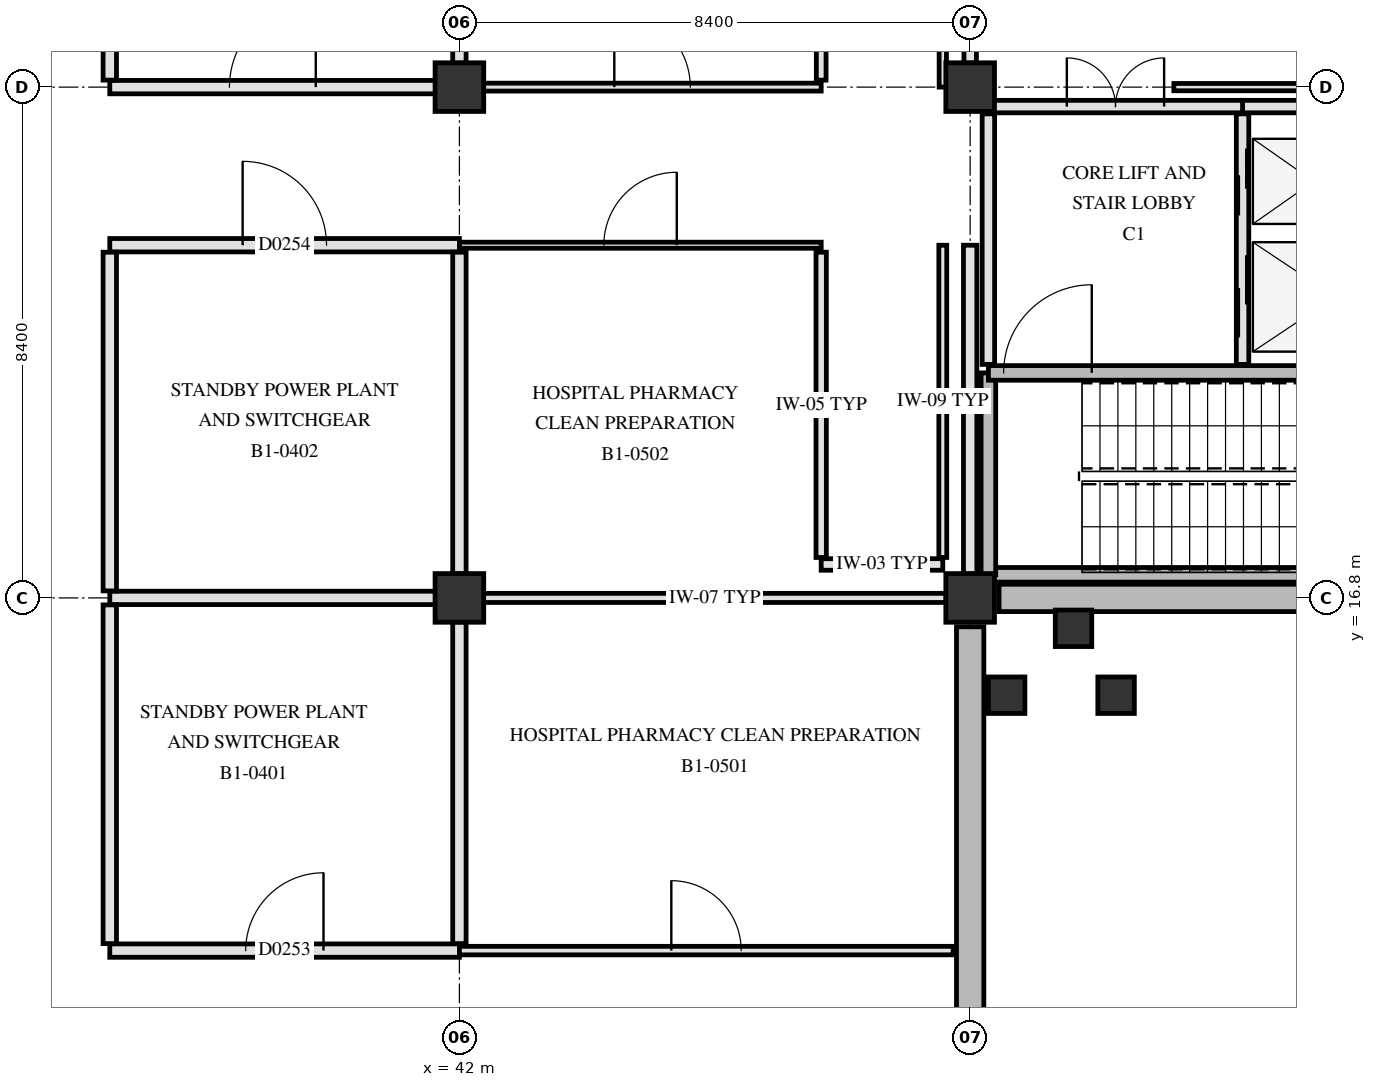
"""IFC4 building model, lengths in metres.
Left out: names, types, materials, properties, quantities, classifications, styles, units other than length and angle.
Written with IfcOpenShell. Run it as: python <this file> out.ifc"""

import sys

from ifc_helpers import new_model, si_unit, direction, frame, frame_2d, origin, origin_2d, place, context, subcontext, project, spatial, rectangle, extrude, element, fill, save


model = new_model("IFC4")
c1 = context("Model", 3, precision=1e-05, world=origin(), true_north=direction((0.0, 1.0)))
c2 = subcontext(c1, "Body", "Model", "MODEL_VIEW")
j1 = project(units=[si_unit("LENGTHUNIT", "METRE"), si_unit("PLANEANGLEUNIT", "RADIAN")], contexts=[c1])
p1 = place(None, origin())
s1 = spatial("IfcSite", under=j1, at=p1, CompositionType="ELEMENT")
p2 = place(p1, origin())
s2 = spatial("IfcBuilding", under=s1, at=p2, CompositionType="ELEMENT")
p3 = place(p2, frame((0.0, 0.0, -5.4)))
s3 = spatial("IfcBuildingStorey", under=s2, at=p3, CompositionType="ELEMENT", Elevation=-5.4)
for number, where, z_axis, x_axis in (
    (1, (42.0, 16.8, 0.0), (0.0, 0.0, 1.0), (1.0, 0.0, 0.0)),
    (2, (42.0, 25.2, 0.0), (0.0, 0.0, 1.0), (1.0, 0.0, 0.0)),
    (3, (50.4, 16.8, 0.0), (0.0, 0.0, 1.0), (1.0, 0.0, 0.0)),
    (4, (50.4, 25.2, 0.0), (0.0, 0.0, 1.0), (1.0, 0.0, 0.0)),
):
    element("IfcColumn", number, at=place(p3, frame(where, z_axis=z_axis, x_axis=x_axis)), inside=s3, PredefinedType="COLUMN", context=c2, shape_type="SweptSolid", body=[
        extrude(rectangle(XDim=0.8, YDim=0.8, at=origin_2d()), origin(), (0.0, 0.0, 1.0), 5.4),
    ])
for number, where, z_axis, x_axis in (
    (5, (58.325, 16.8, 0.0), (0.0, 0.0, 1.0), (-1.0, 0.0, 0.0)),
    (6, (50.4, 16.325, 0.0), (0.0, 0.0, 1.0), (0.0, -1.0, 0.0)),
):
    element("IfcWall", number, at=place(p3, frame(where, z_axis=z_axis, x_axis=x_axis)), inside=s3, PredefinedType="SOLIDWALL", context=c2, shape_type="SweptSolid", body=[
        extrude(rectangle(XDim=7.45, YDim=0.45, at=frame_2d((3.725, 0.0))), origin(), (0.0, 0.0, 1.0), 5.08),
    ])
for number, where, z_axis, x_axis in (
    (7, (52.8, 15.2, 0.0), (0.0, 0.0, 1.0), (1.0, 0.0, 0.0)),
    (8, (51.0, 15.2, 0.0), (0.0, 0.0, 1.0), (1.0, 0.0, 0.0)),
):
    element("IfcColumn", number, at=place(p3, frame(where, z_axis=z_axis, x_axis=x_axis)), inside=s3, PredefinedType="COLUMN", context=c2, shape_type="SweptSolid", body=[
        extrude(rectangle(XDim=0.6, YDim=0.6, at=origin_2d()), origin(), (0.0, 0.0, 1.0), 4.0),
    ])
p4 = place(p3, frame((52.1, 16.3, 0.0), z_axis=(0.0, 0.0, 1.0), x_axis=(1.0, 0.0, 0.0)))
e9 = element("IfcColumn", 9, at=p4, inside=s3, PredefinedType="COLUMN", context=c2, shape_type="SweptSolid", body=[
    extrude(rectangle(XDim=0.6, YDim=0.6, at=origin_2d()), origin(), (0.0, 0.0, 1.0), 5.09),
])
p5 = place(p3, frame((50.7, 17.18, 0.0), z_axis=(0.0, 0.0, 1.0), x_axis=(1.0, 0.0, 0.0)))
e10 = element("IfcWall", 10, at=p5, inside=s3, PredefinedType="SHEAR", context=c2, shape_type="SweptSolid", body=[
    extrude(rectangle(XDim=7.82, YDim=0.24, at=frame_2d((3.91, 0.0))), origin(), (0.0, 0.0, 1.0), 5.08),
])
p6 = place(p3, frame((50.7, 17.18, 0.0), z_axis=(0.0, 0.0, 1.0), x_axis=(0.0, 1.0, 0.0)))
e11 = element("IfcWall", 11, at=p6, inside=s3, PredefinedType="SHEAR", context=c2, shape_type="SweptSolid", body=[
    extrude(rectangle(XDim=3.32, YDim=0.24, at=frame_2d((1.66, 0.0))), origin(), (0.0, 0.0, 1.0), 5.08),
])
p7 = place(p3, frame((50.7, 20.5, 0.0), z_axis=(0.0, 0.0, 1.0), x_axis=(1.0, 0.0, 0.0)))
e12 = element("IfcWall", 12, at=p7, inside=s3, PredefinedType="SHEAR", context=c2, shape_type="SweptSolid", body=[
    extrude(rectangle(XDim=7.82, YDim=0.24, at=frame_2d((3.91, 0.0))), origin(), (0.0, 0.0, 1.0), 5.08),
])
p8 = place(p7, frame((0.25, 0.0, 0.0)))
e13 = element("IfcOpeningElement", 13, at=p8, cuts=e12, PredefinedType="OPENING", context=c2, shape_type="SweptSolid", body=[
    extrude(rectangle(XDim=1.45, YDim=2.2, at=frame_2d((0.725, 1.1))), frame((0.0, 0.13, 0.0), z_axis=(0.0, -1.0, 0.0), x_axis=(1.0, 0.0, 0.0)), (0.0, 0.0, 1.0), 0.26),
])
p9 = place(p3, frame((54.88, 20.64, 0.0), z_axis=(0.0, 0.0, 1.0), x_axis=(0.0, 1.0, 0.0)))
e14 = element("IfcWall", 14, at=p9, inside=s3, PredefinedType="PARTITIONING", context=c2, shape_type="SweptSolid", body=[
    extrude(rectangle(XDim=4.12, YDim=0.205, at=frame_2d((2.06, 0.0))), origin(), (0.0, 0.0, 1.0), 5.07),
])
p10 = place(p9, frame((0.445, 0.0, 0.0)))
e15 = element("IfcOpeningElement", 15, at=p10, cuts=e14, PredefinedType="OPENING", context=c2, shape_type="SweptSolid", body=[
    extrude(rectangle(XDim=1.35, YDim=2.2, at=frame_2d((0.675, 1.1))), frame((0.0, 0.113, 0.0), z_axis=(0.0, -1.0, 0.0), x_axis=(1.0, 0.0, 0.0)), (0.0, 0.0, 1.0), 0.225),
])
p11 = place(p9, frame((2.45, 0.0, 0.0)))
e16 = element("IfcOpeningElement", 16, at=p11, cuts=e14, PredefinedType="OPENING", context=c2, shape_type="SweptSolid", body=[
    extrude(rectangle(XDim=1.1, YDim=2.15, at=frame_2d((0.55, 1.075))), frame((0.0, 0.113, 0.0), z_axis=(0.0, -1.0, 0.0), x_axis=(1.0, 0.0, 0.0)), (0.0, 0.0, 1.0), 0.225),
])
p12 = place(p3, frame((54.88, 24.88, 0.0), z_axis=(0.0, 0.0, 1.0), x_axis=(1.0, 0.0, 0.0)))
e17 = element("IfcWall", 17, at=p12, inside=s3, PredefinedType="PARTITIONING", context=c2, shape_type="SweptSolid", body=[
    extrude(rectangle(XDim=3.57, YDim=0.205, at=frame_2d((1.785, 0.0))), origin(), (0.0, 0.0, 1.0), 4.42),
])
p13 = place(p3, frame((50.7, 20.64, 0.0), z_axis=(0.0, 0.0, 1.0), x_axis=(0.0, 1.0, 0.0)))
e18 = element("IfcWall", 18, at=p13, inside=s3, PredefinedType="PARTITIONING", context=c2, shape_type="SweptSolid", body=[
    extrude(rectangle(XDim=4.12, YDim=0.205, at=frame_2d((2.06, 0.0))), origin(), (0.0, 0.0, 1.0), 4.47),
])
p14 = place(p3, frame((50.7, 24.88, 0.0), z_axis=(0.0, 0.0, 1.0), x_axis=(1.0, 0.0, 0.0)))
e19 = element("IfcWall", 19, at=p14, inside=s3, PredefinedType="PARTITIONING", context=c2, shape_type="SweptSolid", body=[
    extrude(rectangle(XDim=4.18, YDim=0.205, at=frame_2d((2.09, 0.0))), origin(), (0.0, 0.0, 1.0), 4.42),
])
p15 = place(p14, frame((1.29, 0.0, 0.0)))
e20 = element("IfcOpeningElement", 20, at=p15, cuts=e19, PredefinedType="OPENING", context=c2, shape_type="SweptSolid", body=[
    extrude(rectangle(XDim=1.6, YDim=2.25, at=frame_2d((0.8, 1.125))), frame((0.0, 0.113, 0.0), z_axis=(0.0, -1.0, 0.0), x_axis=(1.0, 0.0, 0.0)), (0.0, 0.0, 1.0), 0.225),
])
p16 = place(p3, frame((36.25, 11.0, 0.0), z_axis=(0.0, 0.0, 1.0), x_axis=(1.0, 0.0, 0.0)))
e21 = element("IfcWall", 21, at=p16, inside=s3, PredefinedType="PARTITIONING", context=c2, shape_type="SweptSolid", body=[
    extrude(rectangle(XDim=5.75, YDim=0.22, at=frame_2d((2.875, 0.0))), origin(), (0.0, 0.0, 1.0), 4.47),
])
p17 = place(p16, frame((2.235, 0.0, 0.0)))
e22 = element("IfcOpeningElement", 22, at=p17, cuts=e21, PredefinedType="OPENING", context=c2, shape_type="SweptSolid", body=[
    extrude(rectangle(XDim=1.28, YDim=2.18, at=frame_2d((0.64, 1.09))), frame((0.0, 0.12, 0.0), z_axis=(0.0, -1.0, 0.0), x_axis=(1.0, 0.0, 0.0)), (0.0, 0.0, 1.0), 0.24),
])
p18 = place(p3, frame((42.0, 11.0, 0.0), z_axis=(0.0, 0.0, 1.0), x_axis=(1.0, 0.0, 0.0)))
e23 = element("IfcWall", 23, at=p18, inside=s3, PredefinedType="PARTITIONING", context=c2, shape_type="SweptSolid", body=[
    extrude(rectangle(XDim=8.12, YDim=0.14, at=frame_2d((4.06, 0.0))), origin(), (0.0, 0.0, 1.0), 4.47),
])
p19 = place(p18, frame((3.485, 0.0, 0.0)))
e24 = element("IfcOpeningElement", 24, at=p19, cuts=e23, PredefinedType="OPENING", context=c2, shape_type="SweptSolid", body=[
    extrude(rectangle(XDim=1.15, YDim=2.15, at=frame_2d((0.575, 1.075))), frame((0.0, 0.08, 0.0), z_axis=(0.0, -1.0, 0.0), x_axis=(1.0, 0.0, 0.0)), (0.0, 0.0, 1.0), 0.16),
])
p20 = place(p3, frame((36.25, 16.8, 0.0), z_axis=(0.0, 0.0, 1.0), x_axis=(1.0, 0.0, 0.0)))
e25 = element("IfcWall", 25, at=p20, inside=s3, PredefinedType="PARTITIONING", context=c2, shape_type="SweptSolid", body=[
    extrude(rectangle(XDim=5.355, YDim=0.22, at=frame_2d((2.677, 0.0))), origin(), (0.0, 0.0, 1.0), 4.42),
])
p21 = place(p3, frame((42.395, 16.8, 0.0), z_axis=(0.0, 0.0, 1.0), x_axis=(1.0, 0.0, 0.0)))
e26 = element("IfcWall", 26, at=p21, inside=s3, PredefinedType="PARTITIONING", context=c2, shape_type="SweptSolid", body=[
    extrude(rectangle(XDim=7.61, YDim=0.15, at=frame_2d((3.805, 0.0))), origin(), (0.0, 0.0, 1.0), 4.42),
])
p22 = place(p3, frame((47.95, 17.35, 0.0), z_axis=(0.0, 0.0, 1.0), x_axis=(1.0, 0.0, 0.0)))
e27 = element("IfcWall", 27, at=p22, inside=s3, PredefinedType="PARTITIONING", context=c2, shape_type="SweptSolid", body=[
    extrude(rectangle(XDim=2.0, YDim=0.19, at=frame_2d((1.0, 0.0))), origin(), (0.0, 0.0, 1.0), 5.07),
])
p23 = place(p3, frame((36.25, 22.6, 0.0), z_axis=(0.0, 0.0, 1.0), x_axis=(1.0, 0.0, 0.0)))
e28 = element("IfcWall", 28, at=p23, inside=s3, PredefinedType="PARTITIONING", context=c2, shape_type="SweptSolid", body=[
    extrude(rectangle(XDim=5.75, YDim=0.22, at=frame_2d((2.875, 0.0))), origin(), (0.0, 0.0, 1.0), 4.47),
])
p24 = place(p23, frame((2.185, 0.0, 0.0)))
e29 = element("IfcOpeningElement", 29, at=p24, cuts=e28, PredefinedType="OPENING", context=c2, shape_type="SweptSolid", body=[
    extrude(rectangle(XDim=1.38, YDim=2.22, at=frame_2d((0.69, 1.11))), frame((0.0, 0.12, 0.0), z_axis=(0.0, -1.0, 0.0), x_axis=(1.0, 0.0, 0.0)), (0.0, 0.0, 1.0), 0.24),
])
p25 = place(p3, frame((42.0, 22.6, 0.0), z_axis=(0.0, 0.0, 1.0), x_axis=(1.0, 0.0, 0.0)))
e30 = element("IfcWall", 30, at=p25, inside=s3, PredefinedType="PARTITIONING", context=c2, shape_type="SweptSolid", body=[
    extrude(rectangle(XDim=5.95, YDim=0.1, at=frame_2d((2.975, 0.0))), origin(), (0.0, 0.0, 1.0), 4.47),
])
p26 = place(p25, frame((2.375, 0.0, 0.0)))
e31 = element("IfcOpeningElement", 31, at=p26, cuts=e30, PredefinedType="OPENING", context=c2, shape_type="SweptSolid", body=[
    extrude(rectangle(XDim=1.2, YDim=2.15, at=frame_2d((0.6, 1.075))), frame((0.0, 0.06, 0.0), z_axis=(0.0, -1.0, 0.0), x_axis=(1.0, 0.0, 0.0)), (0.0, 0.0, 1.0), 0.12),
])
p27 = place(p3, frame((36.25, 25.2, 0.0), z_axis=(0.0, 0.0, 1.0), x_axis=(1.0, 0.0, 0.0)))
e32 = element("IfcWall", 32, at=p27, inside=s3, PredefinedType="PARTITIONING", context=c2, shape_type="SweptSolid", body=[
    extrude(rectangle(XDim=5.355, YDim=0.22, at=frame_2d((2.677, 0.0))), origin(), (0.0, 0.0, 1.0), 4.42),
])
p28 = place(p27, frame((1.968, 0.0, 0.0)))
e33 = element("IfcOpeningElement", 33, at=p28, cuts=e32, PredefinedType="OPENING", context=c2, shape_type="SweptSolid", body=[
    extrude(rectangle(XDim=1.42, YDim=2.22, at=frame_2d((0.71, 1.11))), frame((0.0, 0.12, 0.0), z_axis=(0.0, -1.0, 0.0), x_axis=(1.0, 0.0, 0.0)), (0.0, 0.0, 1.0), 0.24),
])
p29 = place(p3, frame((42.395, 25.2, 0.0), z_axis=(0.0, 0.0, 1.0), x_axis=(1.0, 0.0, 0.0)))
e34 = element("IfcWall", 34, at=p29, inside=s3, PredefinedType="PARTITIONING", context=c2, shape_type="SweptSolid", body=[
    extrude(rectangle(XDim=5.555, YDim=0.13, at=frame_2d((2.777, 0.0))), origin(), (0.0, 0.0, 1.0), 4.42),
])
p30 = place(p29, frame((2.153, 0.0, 0.0)))
e35 = element("IfcOpeningElement", 35, at=p30, cuts=e34, PredefinedType="OPENING", context=c2, shape_type="SweptSolid", body=[
    extrude(rectangle(XDim=1.25, YDim=2.2, at=frame_2d((0.625, 1.1))), frame((0.0, 0.075, 0.0), z_axis=(0.0, -1.0, 0.0), x_axis=(1.0, 0.0, 0.0)), (0.0, 0.0, 1.0), 0.15),
])
p31 = place(p3, frame((53.75, 25.2, 0.0), z_axis=(0.0, 0.0, 1.0), x_axis=(1.0, 0.0, 0.0)))
e36 = element("IfcWall", 36, at=p31, inside=s3, PredefinedType="PARTITIONING", context=c2, shape_type="SweptSolid", body=[
    extrude(rectangle(XDim=4.655, YDim=0.12, at=frame_2d((2.328, 0.0))), origin(), (0.0, 0.0, 1.0), 4.42),
])
for number, where, z_axis, x_axis in (
    (37, (36.25, 11.115, 0.0), (0.0, 0.0, 1.0), (0.0, 1.0, 0.0)),
    (38, (36.25, 16.915, 0.0), (0.0, 0.0, 1.0), (0.0, 1.0, 0.0)),
):
    element("IfcWall", number, at=place(p3, frame(where, z_axis=z_axis, x_axis=x_axis)), inside=s3, PredefinedType="PARTITIONING", context=c2, shape_type="SweptSolid", body=[
        extrude(rectangle(XDim=5.57, YDim=0.22, at=frame_2d((2.785, 0.0))), origin(), (0.0, 0.0, 1.0), 4.42),
    ])
p32 = place(p3, frame((36.25, 25.315, 0.0), z_axis=(0.0, 0.0, 1.0), x_axis=(0.0, 1.0, 0.0)))
e39 = element("IfcWall", 39, at=p32, inside=s3, PredefinedType="PARTITIONING", context=c2, shape_type="SweptSolid", body=[
    extrude(rectangle(XDim=8.17, YDim=0.22, at=frame_2d((4.085, 0.0))), origin(), (0.0, 0.0, 1.0), 4.42),
])
for number, where, z_axis, x_axis in (
    (40, (42.0, 11.115, 0.0), (0.0, 0.0, 1.0), (0.0, 1.0, 0.0)),
    (41, (42.0, 17.195, 0.0), (0.0, 0.0, 1.0), (0.0, 1.0, 0.0)),
):
    element("IfcWall", number, at=place(p3, frame(where, z_axis=z_axis, x_axis=x_axis)), inside=s3, PredefinedType="PARTITIONING", context=c2, shape_type="SweptSolid", body=[
        extrude(rectangle(XDim=5.29, YDim=0.22, at=frame_2d((2.645, 0.0))), origin(), (0.0, 0.0, 1.0), 4.47),
    ])
p33 = place(p3, frame((42.0, 25.595, 0.0), z_axis=(0.0, 0.0, 1.0), x_axis=(0.0, 1.0, 0.0)))
e42 = element("IfcWall", 42, at=p33, inside=s3, PredefinedType="PARTITIONING", context=c2, shape_type="SweptSolid", body=[
    extrude(rectangle(XDim=7.61, YDim=0.22, at=frame_2d((3.805, 0.0))), origin(), (0.0, 0.0, 1.0), 4.47),
])
p34 = place(p3, frame((47.95, 17.465, 0.0), z_axis=(0.0, 0.0, 1.0), x_axis=(0.0, 1.0, 0.0)))
e43 = element("IfcWall", 43, at=p34, inside=s3, PredefinedType="PARTITIONING", context=c2, shape_type="SweptSolid", body=[
    extrude(rectangle(XDim=5.02, YDim=0.17, at=frame_2d((2.51, 0.0))), origin(), (0.0, 0.0, 1.0), 5.07),
])
p35 = place(p3, frame((47.95, 25.315, 0.0), z_axis=(0.0, 0.0, 1.0), x_axis=(0.0, 1.0, 0.0)))
e44 = element("IfcWall", 44, at=p35, inside=s3, PredefinedType="PARTITIONING", context=c2, shape_type="SweptSolid", body=[
    extrude(rectangle(XDim=2.22, YDim=0.16, at=frame_2d((1.11, 0.0))), origin(), (0.0, 0.0, 1.0), 4.42),
])
p36 = place(p3, frame((49.95, 17.465, 0.0), z_axis=(0.0, 0.0, 1.0), x_axis=(0.0, 1.0, 0.0)))
e45 = element("IfcWall", 45, at=p36, inside=s3, PredefinedType="PARTITIONING", context=c2, shape_type="SweptSolid", body=[
    extrude(rectangle(XDim=5.135, YDim=0.13, at=frame_2d((2.567, 0.0))), origin(), (0.0, 0.0, 1.0), 5.07),
])
p37 = place(p3, frame((49.95, 25.2, 0.0), z_axis=(0.0, 0.0, 1.0), x_axis=(0.0, 1.0, 0.0)))
e46 = element("IfcWall", 46, at=p37, inside=s3, PredefinedType="PARTITIONING", context=c2, shape_type="SweptSolid", body=[
    extrude(rectangle(XDim=2.335, YDim=0.12, at=frame_2d((1.167, 0.0))), origin(), (0.0, 0.0, 1.0), 4.42),
])
p38 = place(p3, frame((50.4, 17.195, 0.0), z_axis=(0.0, 0.0, 1.0), x_axis=(0.0, 1.0, 0.0)))
e47 = element("IfcWall", 47, at=p38, inside=s3, PredefinedType="PARTITIONING", context=c2, shape_type="SweptSolid", body=[
    extrude(rectangle(XDim=5.405, YDim=0.22, at=frame_2d((2.703, 0.0))), origin(), (0.0, 0.0, 1.0), 4.47),
])
p39 = place(p3, frame((50.4, 25.595, 0.0), z_axis=(0.0, 0.0, 1.0), x_axis=(0.0, 1.0, 0.0)))
e48 = element("IfcWall", 48, at=p39, inside=s3, PredefinedType="PARTITIONING", context=c2, shape_type="SweptSolid", body=[
    extrude(rectangle(XDim=7.61, YDim=0.205, at=frame_2d((3.805, 0.0))), origin(), (0.0, 0.0, 1.0), 4.47),
])
p40 = place(p8, origin())
e49 = element("IfcDoor", 49, at=p40, inside=s3, OperationType="SINGLE_SWING_RIGHT", PredefinedType="DOOR", context=c2, shape_type="SweptSolid", body=[
    extrude(rectangle(XDim=1.45, YDim=2.2, at=frame_2d((0.725, 1.1))), frame((0.0, 0.025, 0.0), z_axis=(0.0, -1.0, 0.0), x_axis=(1.0, 0.0, 0.0)), (0.0, 0.0, 1.0), 0.05),
])
fill(e13, e49)
p41 = place(p10, origin())
e50 = element("IfcDoor", 50, at=p41, inside=s3, OperationType="SLIDING_TO_LEFT", PredefinedType="DOOR", context=c2, shape_type="SweptSolid", body=[
    extrude(rectangle(XDim=1.35, YDim=2.2, at=frame_2d((0.675, 1.1))), frame((0.0, 0.025, 0.0), z_axis=(0.0, -1.0, 0.0), x_axis=(1.0, 0.0, 0.0)), (0.0, 0.0, 1.0), 0.05),
])
fill(e15, e50)
p42 = place(p11, origin())
e51 = element("IfcDoor", 51, at=p42, inside=s3, OperationType="SLIDING_TO_LEFT", PredefinedType="DOOR", context=c2, shape_type="SweptSolid", body=[
    extrude(rectangle(XDim=1.1, YDim=2.15, at=frame_2d((0.55, 1.075))), frame((0.0, 0.025, 0.0), z_axis=(0.0, -1.0, 0.0), x_axis=(1.0, 0.0, 0.0)), (0.0, 0.0, 1.0), 0.05),
])
fill(e16, e51)
p43 = place(p15, origin())
e52 = element("IfcDoor", 52, at=p43, inside=s3, OperationType="DOUBLE_SWING_LEFT", PredefinedType="DOOR", context=c2, shape_type="SweptSolid", body=[
    extrude(rectangle(XDim=1.6, YDim=2.25, at=frame_2d((0.8, 1.125))), frame((0.0, 0.025, 0.0), z_axis=(0.0, -1.0, 0.0), x_axis=(1.0, 0.0, 0.0)), (0.0, 0.0, 1.0), 0.05),
])
fill(e20, e52)
p44 = place(p17, origin())
e53 = element("IfcDoor", 53, at=p44, inside=s3, OperationType="SINGLE_SWING_RIGHT", PredefinedType="DOOR", context=c2, shape_type="SweptSolid", body=[
    extrude(rectangle(XDim=1.28, YDim=2.18, at=frame_2d((0.64, 1.09))), frame((0.0, 0.025, 0.0), z_axis=(0.0, -1.0, 0.0), x_axis=(1.0, 0.0, 0.0)), (0.0, 0.0, 1.0), 0.05),
])
fill(e22, e53)
p45 = place(p24, origin())
e54 = element("IfcDoor", 54, at=p45, inside=s3, OperationType="SINGLE_SWING_LEFT", PredefinedType="DOOR", context=c2, shape_type="SweptSolid", body=[
    extrude(rectangle(XDim=1.38, YDim=2.22, at=frame_2d((0.69, 1.11))), frame((0.0, 0.025, 0.0), z_axis=(0.0, -1.0, 0.0), x_axis=(1.0, 0.0, 0.0)), (0.0, 0.0, 1.0), 0.05),
])
fill(e29, e54)
p46 = place(p28, origin())
e55 = element("IfcDoor", 55, at=p46, inside=s3, OperationType="SINGLE_SWING_RIGHT", PredefinedType="DOOR", context=c2, shape_type="SweptSolid", body=[
    extrude(rectangle(XDim=1.42, YDim=2.22, at=frame_2d((0.71, 1.11))), frame((0.0, 0.025, 0.0), z_axis=(0.0, -1.0, 0.0), x_axis=(1.0, 0.0, 0.0)), (0.0, 0.0, 1.0), 0.05),
])
fill(e33, e55)
p47 = place(p19, origin())
e56 = element("IfcDoor", 56, at=p47, inside=s3, OperationType="SINGLE_SWING_LEFT", PredefinedType="DOOR", context=c2, shape_type="SweptSolid", body=[
    extrude(rectangle(XDim=1.15, YDim=2.15, at=frame_2d((0.575, 1.075))), frame((0.0, 0.025, 0.0), z_axis=(0.0, -1.0, 0.0), x_axis=(1.0, 0.0, 0.0)), (0.0, 0.0, 1.0), 0.05),
])
fill(e24, e56)
p48 = place(p26, origin())
e57 = element("IfcDoor", 57, at=p48, inside=s3, OperationType="SINGLE_SWING_RIGHT", PredefinedType="DOOR", context=c2, shape_type="SweptSolid", body=[
    extrude(rectangle(XDim=1.2, YDim=2.15, at=frame_2d((0.6, 1.075))), frame((0.0, 0.025, 0.0), z_axis=(0.0, -1.0, 0.0), x_axis=(1.0, 0.0, 0.0)), (0.0, 0.0, 1.0), 0.05),
])
fill(e31, e57)
p49 = place(p30, origin())
e58 = element("IfcDoor", 58, at=p49, inside=s3, OperationType="SINGLE_SWING_LEFT", PredefinedType="DOOR", context=c2, shape_type="SweptSolid", body=[
    extrude(rectangle(XDim=1.25, YDim=2.2, at=frame_2d((0.625, 1.1))), frame((0.0, 0.025, 0.0), z_axis=(0.0, -1.0, 0.0), x_axis=(1.0, 0.0, 0.0)), (0.0, 0.0, 1.0), 0.05),
])
fill(e35, e58)
save(model, sys.argv[1])
